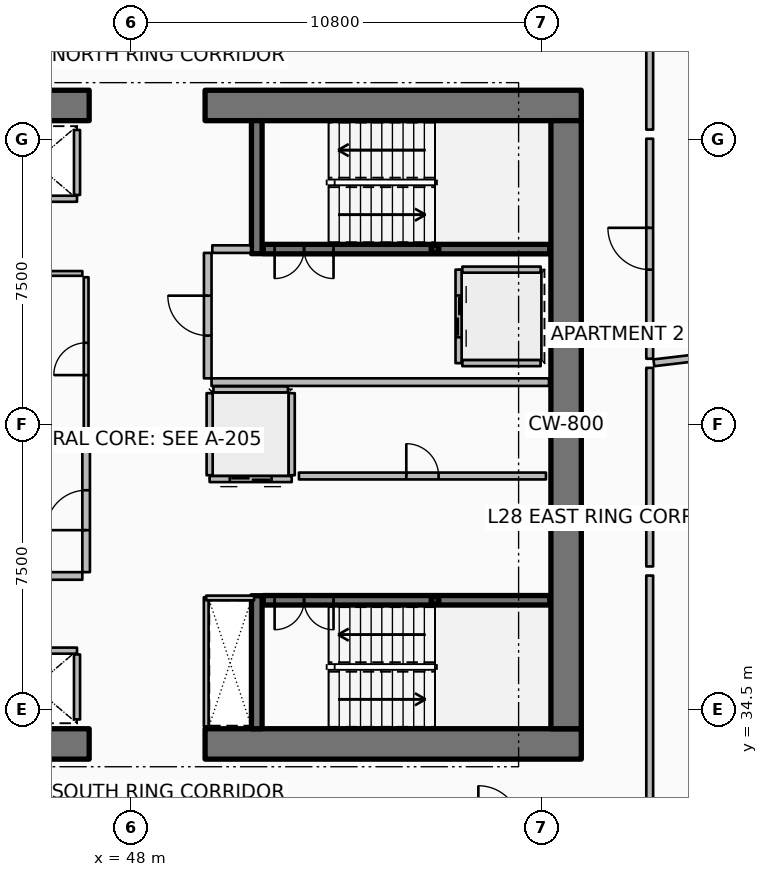
"""IFC4 building model, lengths in metres.
Left out: names, types, materials, properties, quantities, classifications, styles, units other than length and angle.
Written with IfcOpenShell. Run it as: python <this file> out.ifc"""

import sys

from ifc_helpers import new_model, si_unit, direction, frame, frame_2d, origin, origin_2d, place, context, subcontext, project, spatial, rectangle, hollow_rectangle, extrude, element, fill, save


model = new_model("IFC4")
c1 = context("Model", 3, precision=1e-05, world=origin(), true_north=direction((0.0, 1.0)))
c2 = subcontext(c1, "Body", "Model", "MODEL_VIEW")
j1 = project(units=[si_unit("LENGTHUNIT", "METRE"), si_unit("PLANEANGLEUNIT", "RADIAN")], contexts=[c1])
p1 = place(None, origin())
s1 = spatial("IfcSite", under=j1, at=p1, CompositionType="ELEMENT")
p2 = place(p1, origin())
s2 = spatial("IfcBuilding", under=s1, at=p2, CompositionType="ELEMENT")
p3 = place(p2, frame((0.0, 0.0, 112.65)))
s3 = spatial("IfcBuildingStorey", under=s2, at=p3, CompositionType="ELEMENT", Elevation=112.65)
p4 = place(p3, frame((37.0, 33.6, 0.0), z_axis=(0.0, 0.0, 1.0), x_axis=(1.0, 0.0, 0.0)))
e1 = element("IfcWall", 1, at=p4, inside=s3, PredefinedType="SHEAR", context=c2, shape_type="SweptSolid", body=[
    extrude(rectangle(XDim=9.9, YDim=0.8, at=frame_2d((4.95, 0.0))), origin(), (0.0, 0.0, 1.0), 3.75),
])
p5 = place(p3, frame((49.95, 33.6, 0.0), z_axis=(0.0, 0.0, 1.0), x_axis=(1.0, 0.0, 0.0)))
e2 = element("IfcWall", 2, at=p5, inside=s3, PredefinedType="SHEAR", context=c2, shape_type="SweptSolid", body=[
    extrude(rectangle(XDim=9.9, YDim=0.8, at=frame_2d((4.95, 0.0))), origin(), (0.0, 0.0, 1.0), 3.75),
])
p6 = place(p3, frame((37.0, 50.4, 0.0), z_axis=(0.0, 0.0, 1.0), x_axis=(1.0, 0.0, 0.0)))
e3 = element("IfcWall", 3, at=p6, inside=s3, PredefinedType="SHEAR", context=c2, shape_type="SweptSolid", body=[
    extrude(rectangle(XDim=9.9, YDim=0.8, at=frame_2d((4.95, 0.0))), origin(), (0.0, 0.0, 1.0), 3.75),
])
p7 = place(p3, frame((49.95, 50.4, 0.0), z_axis=(0.0, 0.0, 1.0), x_axis=(1.0, 0.0, 0.0)))
e4 = element("IfcWall", 4, at=p7, inside=s3, PredefinedType="SHEAR", context=c2, shape_type="SweptSolid", body=[
    extrude(rectangle(XDim=9.9, YDim=0.8, at=frame_2d((4.95, 0.0))), origin(), (0.0, 0.0, 1.0), 3.75),
])
p8 = place(p3, frame((59.45, 34.0, 0.0), z_axis=(0.0, 0.0, 1.0), x_axis=(0.0, 1.0, 0.0)))
e5 = element("IfcWall", 5, at=p8, inside=s3, PredefinedType="SHEAR", context=c2, shape_type="SweptSolid", body=[
    extrude(rectangle(XDim=16.0, YDim=0.8, at=frame_2d((8.0, 0.0))), origin(), (0.0, 0.0, 1.0), 3.75),
])
for number, where, z_axis, x_axis in (
    (6, (51.31, 46.5, 0.0), (0.0, 0.0, 1.0), (0.0, 1.0, 0.0)),
    (7, (51.31, 34.0, 0.0), (0.0, 0.0, 1.0), (0.0, 1.0, 0.0)),
):
    element("IfcWall", number, at=place(p3, frame(where, z_axis=z_axis, x_axis=x_axis)), inside=s3, PredefinedType="SHEAR", context=c2, shape_type="SweptSolid", body=[
        extrude(rectangle(XDim=3.5, YDim=0.28, at=frame_2d((1.75, 0.0))), origin(), (0.0, 0.0, 1.0), 3.75),
    ])
for number, where, z_axis, x_axis in (
    (8, (56.0, 46.62, 0.0), (0.0, 0.0, 1.0), (1.0, 0.0, 0.0)),
    (9, (56.0, 37.38, 0.0), (0.0, 0.0, 1.0), (1.0, 0.0, 0.0)),
):
    element("IfcColumn", number, at=place(p3, frame(where, z_axis=z_axis, x_axis=x_axis)), inside=s3, PredefinedType="COLUMN", context=c2, shape_type="SweptSolid", body=[
        extrude(hollow_rectangle(XDim=0.2, YDim=0.2, WallThickness=0.01, InnerFilletRadius=0.01, OuterFilletRadius=0.02, at=origin_2d()), origin(), (0.0, 0.0, 1.0), 1.67),
    ])
p9 = place(p3, frame((51.48, 46.62, 0.0), z_axis=(0.0, 0.0, 1.0), x_axis=(1.0, 0.0, 0.0)))
e10 = element("IfcWall", 10, at=p9, inside=s3, PredefinedType="SOLIDWALL", context=c2, shape_type="SweptSolid", body=[
    extrude(rectangle(XDim=7.54, YDim=0.25, at=frame_2d((3.77, 0.0))), origin(), (0.0, 0.0, 1.0), 3.47),
])
p10 = place(p9, frame((0.3, 0.0, 0.0)))
e11 = element("IfcOpeningElement", 11, at=p10, cuts=e10, PredefinedType="OPENING", context=c2, shape_type="SweptSolid", body=[
    extrude(rectangle(XDim=1.55, YDim=2.15, at=frame_2d((0.775, 1.075))), frame((0.0, 0.135, 0.0), z_axis=(0.0, -1.0, 0.0), x_axis=(1.0, 0.0, 0.0)), (0.0, 0.0, 1.0), 0.27),
])
p11 = place(p3, frame((51.48, 37.38, 0.0), z_axis=(0.0, 0.0, 1.0), x_axis=(1.0, 0.0, 0.0)))
e12 = element("IfcWall", 12, at=p11, inside=s3, PredefinedType="SOLIDWALL", context=c2, shape_type="SweptSolid", body=[
    extrude(rectangle(XDim=7.54, YDim=0.25, at=frame_2d((3.77, 0.0))), origin(), (0.0, 0.0, 1.0), 3.47),
])
p12 = place(p11, frame((0.3, 0.0, 0.0)))
e13 = element("IfcOpeningElement", 13, at=p12, cuts=e12, PredefinedType="OPENING", context=c2, shape_type="SweptSolid", body=[
    extrude(rectangle(XDim=1.55, YDim=2.15, at=frame_2d((0.775, 1.075))), frame((0.0, 0.135, 0.0), z_axis=(0.0, -1.0, 0.0), x_axis=(1.0, 0.0, 0.0)), (0.0, 0.0, 1.0), 0.27),
])
p13 = place(p3, frame((46.58, 47.945, 0.0), z_axis=(0.0, 0.0, 1.0), x_axis=(-1.0, 0.0, 0.0)))
e14 = element("IfcWall", 14, at=p13, inside=s3, PredefinedType="PARTITIONING", context=c2, shape_type="SweptSolid", body=[
    extrude(rectangle(XDim=2.26, YDim=0.16, at=frame_2d((1.13, 0.0))), origin(), (0.0, 0.0, 1.0), 3.47),
])
p14 = place(p3, frame((46.58, 48.045, 0.0), z_axis=(0.0, 0.0, 1.0), x_axis=(0.0, 1.0, 0.0)))
e15 = element("IfcWall", 15, at=p14, inside=s3, PredefinedType="PARTITIONING", context=c2, shape_type="SweptSolid", body=[
    extrude(rectangle(XDim=1.71, YDim=0.16, at=frame_2d((0.855, 0.0))), origin(), (0.0, 0.0, 1.0), 3.47),
])
p15 = place(p3, frame((44.32, 36.055, 0.0), z_axis=(0.0, 0.0, 1.0), x_axis=(1.0, 0.0, 0.0)))
e16 = element("IfcWall", 16, at=p15, inside=s3, PredefinedType="PARTITIONING", context=c2, shape_type="SweptSolid", body=[
    extrude(rectangle(XDim=2.26, YDim=0.16, at=frame_2d((1.13, 0.0))), origin(), (0.0, 0.0, 1.0), 3.47),
])
p16 = place(p3, frame((46.58, 34.245, 0.0), z_axis=(0.0, 0.0, 1.0), x_axis=(0.0, 1.0, 0.0)))
e17 = element("IfcWall", 17, at=p16, inside=s3, PredefinedType="PARTITIONING", context=c2, shape_type="SweptSolid", body=[
    extrude(rectangle(XDim=1.71, YDim=0.16, at=frame_2d((0.855, 0.0))), origin(), (0.0, 0.0, 1.0), 3.47),
])
p17 = place(p3, frame((56.62, 46.08, 0.0), z_axis=(0.0, 0.0, 1.0), x_axis=(0.0, -1.0, 0.0)))
e18 = element("IfcWall", 18, at=p17, inside=s3, PredefinedType="PARTITIONING", context=c2, shape_type="SweptSolid", body=[
    extrude(rectangle(XDim=2.46, YDim=0.16, at=frame_2d((1.23, 0.0))), origin(), (0.0, 0.0, 1.0), 3.47),
])
p18 = place(p17, frame((0.68, 0.0, 0.0)))
e19 = element("IfcOpeningElement", 19, at=p18, cuts=e18, PredefinedType="OPENING", context=c2, shape_type="SweptSolid", body=[
    extrude(rectangle(XDim=1.1, YDim=2.1, at=frame_2d((0.55, 1.05))), frame((0.0, 0.09, 0.0), z_axis=(0.0, -1.0, 0.0), x_axis=(1.0, 0.0, 0.0)), (0.0, 0.0, 1.0), 0.18),
])
for number, where, z_axis, x_axis in (
    (20, (56.72, 46.08, 0.0), (0.0, 0.0, 1.0), (1.0, 0.0, 0.0)),
    (21, (56.72, 43.62, 0.0), (0.0, 0.0, 1.0), (1.0, 0.0, 0.0)),
):
    element("IfcWall", number, at=place(p3, frame(where, z_axis=z_axis, x_axis=x_axis)), inside=s3, PredefinedType="PARTITIONING", context=c2, shape_type="SweptSolid", body=[
        extrude(rectangle(XDim=2.06, YDim=0.16, at=frame_2d((1.03, 0.0))), origin(), (0.0, 0.0, 1.0), 3.47),
    ])
p19 = place(p3, frame((52.23, 40.57, 0.0), z_axis=(0.0, 0.0, 1.0), x_axis=(-1.0, 0.0, 0.0)))
e22 = element("IfcWall", 22, at=p19, inside=s3, PredefinedType="PARTITIONING", context=c2, shape_type="SweptSolid", body=[
    extrude(rectangle(XDim=2.16, YDim=0.16, at=frame_2d((1.08, 0.0))), origin(), (0.0, 0.0, 1.0), 3.47),
])
p20 = place(p19, frame((0.53, 0.0, 0.0)))
e23 = element("IfcOpeningElement", 23, at=p20, cuts=e22, PredefinedType="OPENING", context=c2, shape_type="SweptSolid", body=[
    extrude(rectangle(XDim=1.1, YDim=2.1, at=frame_2d((0.55, 1.05))), frame((0.0, 0.09, 0.0), z_axis=(0.0, -1.0, 0.0), x_axis=(1.0, 0.0, 0.0)), (0.0, 0.0, 1.0), 0.18),
])
for number, where, z_axis, x_axis in (
    (24, (52.23, 40.67, 0.0), (0.0, 0.0, 1.0), (0.0, 1.0, 0.0)),
    (25, (50.07, 40.67, 0.0), (0.0, 0.0, 1.0), (0.0, 1.0, 0.0)),
):
    element("IfcWall", number, at=place(p3, frame(where, z_axis=z_axis, x_axis=x_axis)), inside=s3, PredefinedType="PARTITIONING", context=c2, shape_type="SweptSolid", body=[
        extrude(rectangle(XDim=2.16, YDim=0.16, at=frame_2d((1.08, 0.0))), origin(), (0.0, 0.0, 1.0), 3.47),
    ])
p21 = place(p3, frame((50.17, 42.93, 0.0), z_axis=(0.0, 0.0, 1.0), x_axis=(1.0, 0.0, 0.0)))
e26 = element("IfcWall", 26, at=p21, inside=s3, PredefinedType="PARTITIONING", context=c2, shape_type="SweptSolid", body=[
    extrude(rectangle(XDim=1.96, YDim=0.16, at=frame_2d((0.98, 0.0))), origin(), (0.0, 0.0, 1.0), 3.47),
])
p22 = place(p3, frame((52.42, 40.65, 0.0), z_axis=(0.0, 0.0, 1.0), x_axis=(1.0, 0.0, 0.0)))
e27 = element("IfcWall", 27, at=p22, inside=s3, PredefinedType="PARTITIONING", context=c2, shape_type="SweptSolid", body=[
    extrude(rectangle(XDim=6.5, YDim=0.18, at=frame_2d((3.25, 0.0))), origin(), (0.0, 0.0, 1.0), 3.47),
])
p23 = place(p22, frame((2.825, 0.0, 0.0)))
e28 = element("IfcOpeningElement", 28, at=p23, cuts=e27, PredefinedType="OPENING", context=c2, shape_type="SweptSolid", body=[
    extrude(rectangle(XDim=0.85, YDim=2.06, at=frame_2d((0.425, 1.03))), frame((0.0, 0.1, 0.0), z_axis=(0.0, -1.0, 0.0), x_axis=(1.0, 0.0, 0.0)), (0.0, 0.0, 1.0), 0.2),
])
p24 = place(p3, frame((41.35, 38.02, 0.0), z_axis=(0.0, 0.0, 1.0), x_axis=(1.0, 0.0, 0.0)))
e29 = element("IfcWall", 29, at=p24, inside=s3, PredefinedType="PARTITIONING", context=c2, shape_type="SweptSolid", body=[
    extrude(rectangle(XDim=5.37, YDim=0.2, at=frame_2d((2.685, 0.0))), origin(), (0.0, 0.0, 1.0), 3.47),
])
p25 = place(p3, frame((43.92, 41.48, 0.0), z_axis=(0.0, 0.0, 1.0), x_axis=(1.0, 0.0, 0.0)))
e30 = element("IfcWall", 30, at=p25, inside=s3, PredefinedType="PARTITIONING", context=c2, shape_type="SweptSolid", body=[
    extrude(rectangle(XDim=2.8, YDim=0.2, at=frame_2d((1.4, 0.0))), origin(), (0.0, 0.0, 1.0), 3.47),
])
p26 = place(p3, frame((46.82, 38.12, 0.0), z_axis=(0.0, 0.0, 1.0), x_axis=(0.0, 1.0, 0.0)))
e31 = element("IfcWall", 31, at=p26, inside=s3, PredefinedType="PARTITIONING", context=c2, shape_type="SweptSolid", body=[
    extrude(rectangle(XDim=3.26, YDim=0.2, at=frame_2d((1.63, 0.0))), origin(), (0.0, 0.0, 1.0), 3.47),
])
p27 = place(p26, frame((1.105, 0.0, 0.0)))
e32 = element("IfcOpeningElement", 32, at=p27, cuts=e31, PredefinedType="OPENING", context=c2, shape_type="SweptSolid", body=[
    extrude(rectangle(XDim=1.05, YDim=2.1, at=frame_2d((0.525, 1.05))), frame((0.0, 0.11, 0.0), z_axis=(0.0, -1.0, 0.0), x_axis=(1.0, 0.0, 0.0)), (0.0, 0.0, 1.0), 0.22),
])
p28 = place(p3, frame((50.12, 43.12, 0.0), z_axis=(0.0, 0.0, 1.0), x_axis=(1.0, 0.0, 0.0)))
e33 = element("IfcWall", 33, at=p28, inside=s3, PredefinedType="PARTITIONING", context=c2, shape_type="SweptSolid", body=[
    extrude(rectangle(XDim=8.88, YDim=0.2, at=frame_2d((4.44, 0.0))), origin(), (0.0, 0.0, 1.0), 3.47),
])
p29 = place(p3, frame((50.14, 46.62, 0.0), z_axis=(0.0, 0.0, 1.0), x_axis=(1.0, 0.0, 0.0)))
e34 = element("IfcWall", 34, at=p29, inside=s3, PredefinedType="PARTITIONING", context=c2, shape_type="SweptSolid", body=[
    extrude(rectangle(XDim=1.02, YDim=0.2, at=frame_2d((0.51, 0.0))), origin(), (0.0, 0.0, 1.0), 3.47),
])
p30 = place(p3, frame((50.02, 43.22, 0.0), z_axis=(0.0, 0.0, 1.0), x_axis=(0.0, 1.0, 0.0)))
e35 = element("IfcWall", 35, at=p30, inside=s3, PredefinedType="PARTITIONING", context=c2, shape_type="SweptSolid", body=[
    extrude(rectangle(XDim=3.3, YDim=0.2, at=frame_2d((1.65, 0.0))), origin(), (0.0, 0.0, 1.0), 3.47),
])
p31 = place(p30, frame((1.125, 0.0, 0.0)))
e36 = element("IfcOpeningElement", 36, at=p31, cuts=e35, PredefinedType="OPENING", context=c2, shape_type="SweptSolid", body=[
    extrude(rectangle(XDim=1.05, YDim=2.1, at=frame_2d((0.525, 1.05))), frame((0.0, 0.11, 0.0), z_axis=(0.0, -1.0, 0.0), x_axis=(1.0, 0.0, 0.0)), (0.0, 0.0, 1.0), 0.22),
])
p32 = place(p3, frame((41.36, 45.98, 0.0), z_axis=(0.0, 0.0, 1.0), x_axis=(1.0, 0.0, 0.0)))
e37 = element("IfcWall", 37, at=p32, inside=s3, PredefinedType="PARTITIONING", context=c2, shape_type="SweptSolid", body=[
    extrude(rectangle(XDim=5.36, YDim=0.125, at=frame_2d((2.68, 0.0))), origin(), (0.0, 0.0, 1.0), 2.91),
])
p33 = place(p3, frame((49.98, 34.06, 0.0), z_axis=(0.0, 0.0, 1.0), x_axis=(0.0, 1.0, 0.0)))
e38 = element("IfcWall", 38, at=p33, inside=s3, PredefinedType="PARTITIONING", context=c2, shape_type="SweptSolid", body=[
    extrude(rectangle(XDim=3.4, YDim=0.125, at=frame_2d((1.7, 0.0))), origin(), (0.0, 0.0, 1.0), 2.91),
])
p34 = place(p3, frame((49.98, 37.44, 0.0), z_axis=(0.0, 0.0, 1.0), x_axis=(1.0, 0.0, 0.0)))
e39 = element("IfcWall", 39, at=p34, inside=s3, PredefinedType="PARTITIONING", context=c2, shape_type="SweptSolid", body=[
    extrude(rectangle(XDim=1.26, YDim=0.125, at=frame_2d((0.63, 0.0))), origin(), (0.0, 0.0, 1.0), 2.91),
])
p35 = place(p3, frame((46.82, 41.58, 0.0), z_axis=(0.0, 0.0, 1.0), x_axis=(0.0, 1.0, 0.0)))
e40 = element("IfcWall", 40, at=p35, inside=s3, PredefinedType="PARTITIONING", context=c2, shape_type="SweptSolid", body=[
    extrude(rectangle(XDim=4.3, YDim=0.125, at=frame_2d((2.15, 0.0))), origin(), (0.0, 0.0, 1.0), 2.91),
])
p36 = place(p35, frame((1.725, 0.0, 0.0)))
e41 = element("IfcOpeningElement", 41, at=p36, cuts=e40, PredefinedType="OPENING", context=c2, shape_type="SweptSolid", body=[
    extrude(rectangle(XDim=0.85, YDim=2.06, at=frame_2d((0.425, 1.03))), frame((0.0, 0.073, 0.0), z_axis=(0.0, -1.0, 0.0), x_axis=(1.0, 0.0, 0.0)), (0.0, 0.0, 1.0), 0.145),
])
p37 = place(p3, frame((61.759, 43.628, 0.0), z_axis=(0.0, 0.0, 1.0), x_axis=(0.99306822875, 0.117539325539, 0.0)))
e42 = element("IfcWall", 42, at=p37, inside=s3, PredefinedType="PARTITIONING", context=c2, shape_type="SweptSolid", body=[
    extrude(rectangle(XDim=15.624, YDim=0.18, at=frame_2d((7.812, 0.0))), origin(), (0.0, 0.0, 1.0), 2.427),
])
p38 = place(p3, frame((61.65, 31.52, 0.0), z_axis=(0.0, 0.0, 1.0), x_axis=(0.0, 1.0, 0.0)))
e43 = element("IfcWall", 43, at=p38, inside=s3, PredefinedType="PARTITIONING", context=c2, shape_type="SweptSolid", body=[
    extrude(rectangle(XDim=6.51, YDim=0.18, at=frame_2d((3.255, 0.0))), origin(), (0.0, 0.0, 1.0), 2.427),
])
p39 = place(p3, frame((61.65, 38.27, 0.0), z_axis=(0.0, 0.0, 1.0), x_axis=(0.0, 1.0, 0.0)))
e44 = element("IfcWall", 44, at=p39, inside=s3, PredefinedType="PARTITIONING", context=c2, shape_type="SweptSolid", body=[
    extrude(rectangle(XDim=5.225, YDim=0.18, at=frame_2d((2.613, 0.0))), origin(), (0.0, 0.0, 1.0), 2.427),
])
p40 = place(p3, frame((61.65, 43.736, 0.0), z_axis=(0.0, 0.0, 1.0), x_axis=(0.0, 1.0, 0.0)))
e45 = element("IfcWall", 45, at=p40, inside=s3, PredefinedType="PARTITIONING", context=c2, shape_type="SweptSolid", body=[
    extrude(rectangle(XDim=5.789, YDim=0.18, at=frame_2d((2.895, 0.0))), origin(), (0.0, 0.0, 1.0), 2.427),
])
p41 = place(p40, frame((2.344, 0.0, 0.0)))
e46 = element("IfcOpeningElement", 46, at=p41, cuts=e45, PredefinedType="OPENING", context=c2, shape_type="SweptSolid", body=[
    extrude(rectangle(XDim=1.1, YDim=2.1, at=frame_2d((0.55, 1.05))), frame((0.0, 0.1, 0.0), z_axis=(0.0, -1.0, 0.0), x_axis=(1.0, 0.0, 0.0)), (0.0, 0.0, 1.0), 0.2),
])
p42 = place(p3, frame((61.65, 49.764, 0.0), z_axis=(0.0, 0.0, 1.0), x_axis=(0.0, 1.0, 0.0)))
e47 = element("IfcWall", 47, at=p42, inside=s3, PredefinedType="PARTITIONING", context=c2, shape_type="SweptSolid", body=[
    extrude(rectangle(XDim=2.716, YDim=0.18, at=frame_2d((1.358, 0.0))), origin(), (0.0, 0.0, 1.0), 2.427),
])
p43 = place(p10, origin())
e48 = element("IfcDoor", 48, at=p43, inside=s3, OperationType="DOUBLE_DOOR_SINGLE_SWING", PredefinedType="DOOR", context=c2, shape_type="SweptSolid", body=[
    extrude(rectangle(XDim=1.55, YDim=2.15, at=frame_2d((0.775, 1.075))), frame((0.0, 0.025, 0.0), z_axis=(0.0, -1.0, 0.0), x_axis=(1.0, 0.0, 0.0)), (0.0, 0.0, 1.0), 0.05),
])
fill(e11, e48)
p44 = place(p12, origin())
e49 = element("IfcDoor", 49, at=p44, inside=s3, OperationType="DOUBLE_DOOR_SINGLE_SWING", PredefinedType="DOOR", context=c2, shape_type="SweptSolid", body=[
    extrude(rectangle(XDim=1.55, YDim=2.15, at=frame_2d((0.775, 1.075))), frame((0.0, 0.025, 0.0), z_axis=(0.0, -1.0, 0.0), x_axis=(1.0, 0.0, 0.0)), (0.0, 0.0, 1.0), 0.05),
])
fill(e13, e49)
p45 = place(p18, origin())
e50 = element("IfcDoor", 50, at=p45, inside=s3, OperationType="DOUBLE_DOOR_SLIDING", PredefinedType="DOOR", context=c2, shape_type="SweptSolid", body=[
    extrude(rectangle(XDim=1.1, YDim=2.1, at=frame_2d((0.55, 1.05))), frame((0.0, 0.025, 0.0), z_axis=(0.0, -1.0, 0.0), x_axis=(1.0, 0.0, 0.0)), (0.0, 0.0, 1.0), 0.05),
])
fill(e19, e50)
p46 = place(p20, origin())
e51 = element("IfcDoor", 51, at=p46, inside=s3, OperationType="DOUBLE_DOOR_SLIDING", PredefinedType="DOOR", context=c2, shape_type="SweptSolid", body=[
    extrude(rectangle(XDim=1.1, YDim=2.1, at=frame_2d((0.55, 1.05))), frame((0.0, 0.025, 0.0), z_axis=(0.0, -1.0, 0.0), x_axis=(1.0, 0.0, 0.0)), (0.0, 0.0, 1.0), 0.05),
])
fill(e23, e51)
p47 = place(p23, origin())
e52 = element("IfcDoor", 52, at=p47, inside=s3, OperationType="SINGLE_SWING_LEFT", PredefinedType="DOOR", context=c2, shape_type="SweptSolid", body=[
    extrude(rectangle(XDim=0.85, YDim=2.06, at=frame_2d((0.425, 1.03))), frame((0.0, 0.025, 0.0), z_axis=(0.0, -1.0, 0.0), x_axis=(1.0, 0.0, 0.0)), (0.0, 0.0, 1.0), 0.05),
])
fill(e28, e52)
p48 = place(p27, origin())
e53 = element("IfcDoor", 53, at=p48, inside=s3, OperationType="SINGLE_SWING_LEFT", PredefinedType="DOOR", context=c2, shape_type="SweptSolid", body=[
    extrude(rectangle(XDim=1.05, YDim=2.1, at=frame_2d((0.525, 1.05))), frame((0.0, 0.025, 0.0), z_axis=(0.0, -1.0, 0.0), x_axis=(1.0, 0.0, 0.0)), (0.0, 0.0, 1.0), 0.05),
])
fill(e32, e53)
p49 = place(p31, origin())
e54 = element("IfcDoor", 54, at=p49, inside=s3, OperationType="SINGLE_SWING_RIGHT", PredefinedType="DOOR", context=c2, shape_type="SweptSolid", body=[
    extrude(rectangle(XDim=1.05, YDim=2.1, at=frame_2d((0.525, 1.05))), frame((0.0, 0.025, 0.0), z_axis=(0.0, -1.0, 0.0), x_axis=(1.0, 0.0, 0.0)), (0.0, 0.0, 1.0), 0.05),
])
fill(e36, e54)
p50 = place(p36, origin())
e55 = element("IfcDoor", 55, at=p50, inside=s3, OperationType="SINGLE_SWING_LEFT", PredefinedType="DOOR", context=c2, shape_type="SweptSolid", body=[
    extrude(rectangle(XDim=0.85, YDim=2.06, at=frame_2d((0.425, 1.03))), frame((0.0, 0.025, 0.0), z_axis=(0.0, -1.0, 0.0), x_axis=(1.0, 0.0, 0.0)), (0.0, 0.0, 1.0), 0.05),
])
fill(e41, e55)
p51 = place(p41, origin())
e56 = element("IfcDoor", 56, at=p51, inside=s3, OperationType="SINGLE_SWING_RIGHT", PredefinedType="DOOR", context=c2, shape_type="SweptSolid", body=[
    extrude(rectangle(XDim=1.1, YDim=2.1, at=frame_2d((0.55, 1.05))), frame((0.0, 0.025, 0.0), z_axis=(0.0, -1.0, 0.0), x_axis=(1.0, 0.0, 0.0)), (0.0, 0.0, 1.0), 0.05),
])
fill(e46, e56)
save(model, sys.argv[1])
